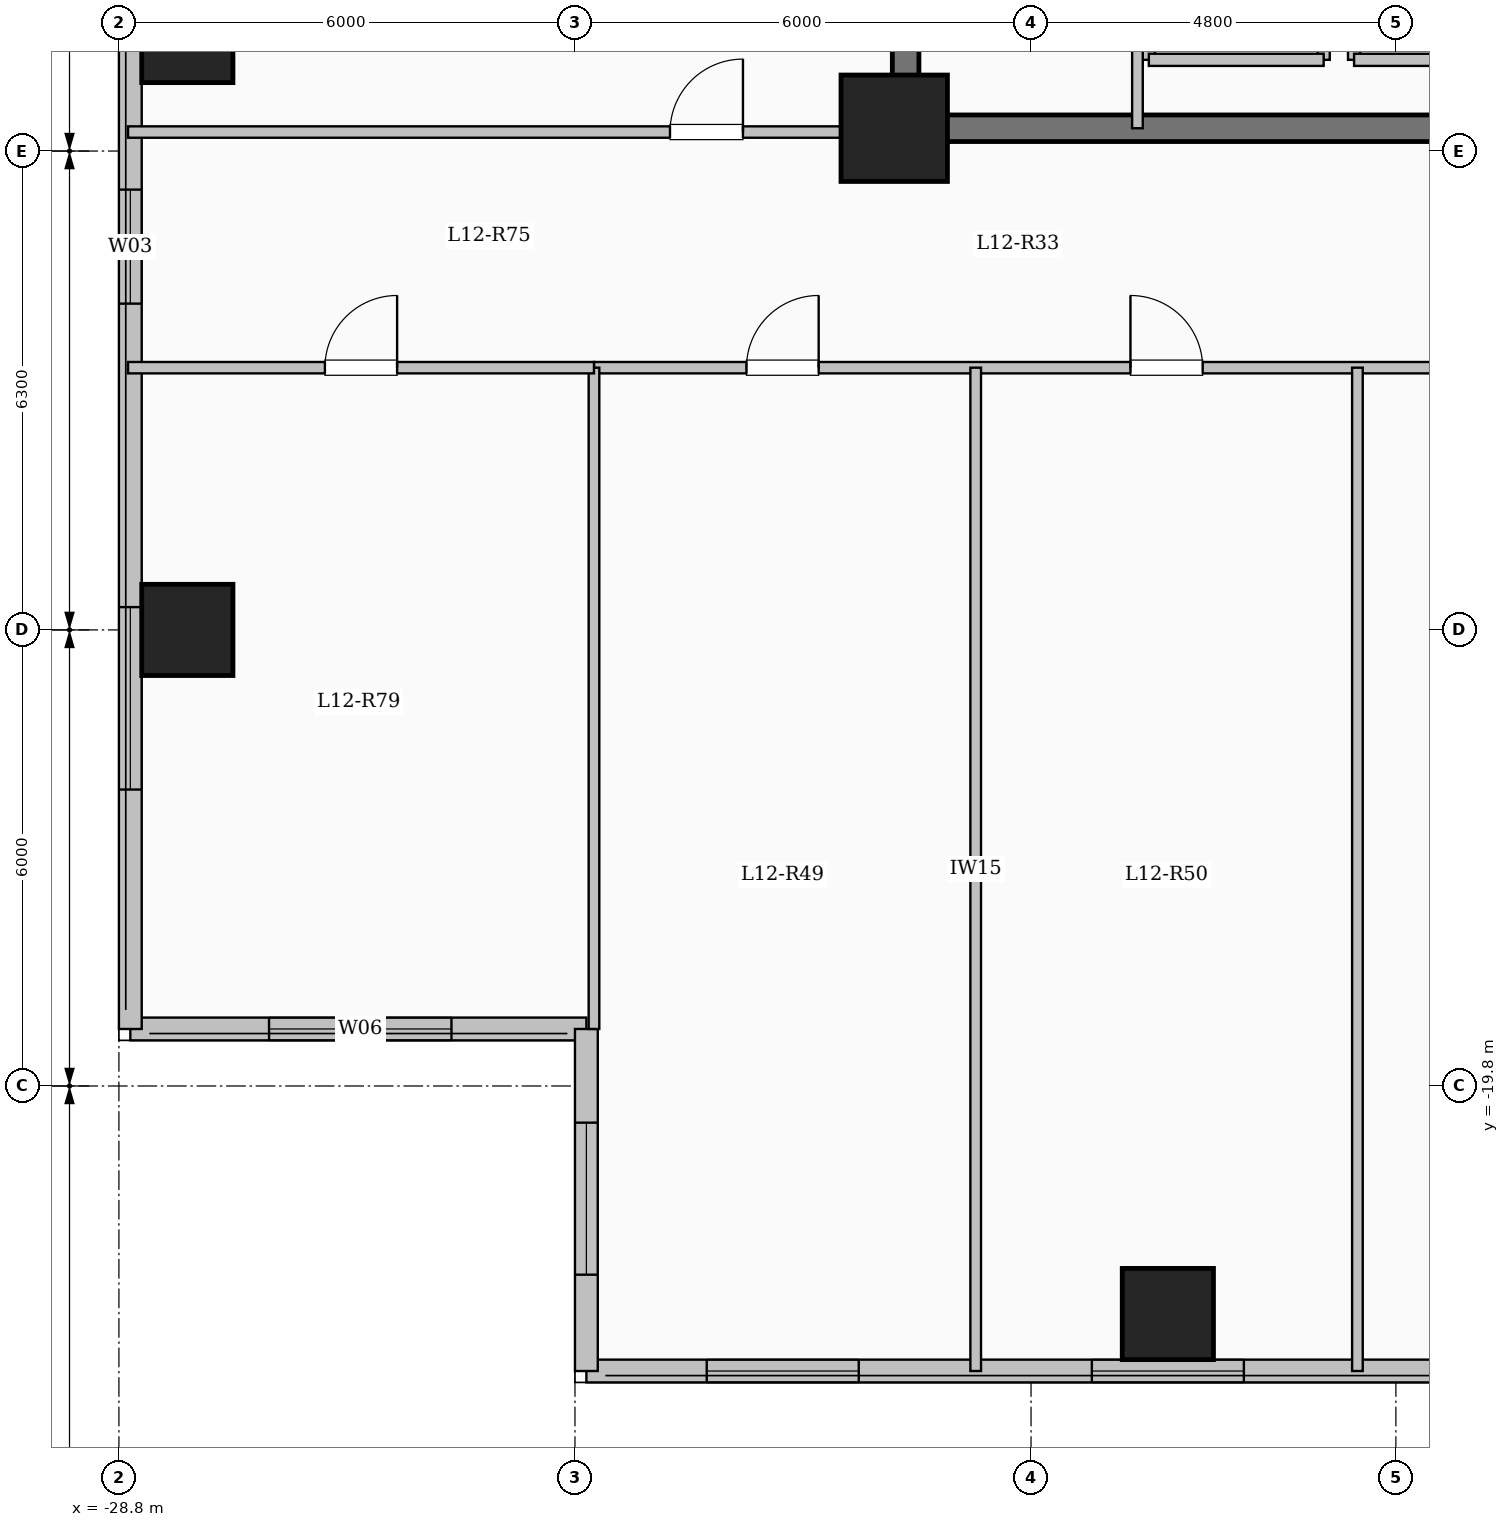
"""IFC4 building model, lengths in metres.
Left out: names, types, materials, properties, quantities, classifications, styles, units other than length and angle.
Written with IfcOpenShell. Run it as: python <this file> out.ifc"""

import sys

from ifc_helpers import new_model, si_unit, direction, frame, frame_2d, origin, origin_2d, place, context, subcontext, project, spatial, rectangle, extrude, element, fill, save


model = new_model("IFC4")
c1 = context("Model", 3, precision=1e-05, world=origin(), true_north=direction((0.0, 1.0)))
c2 = subcontext(c1, "Body", "Model", "MODEL_VIEW")
j1 = project(units=[si_unit("LENGTHUNIT", "METRE"), si_unit("PLANEANGLEUNIT", "RADIAN")], contexts=[c1])
p1 = place(None, origin())
s1 = spatial("IfcSite", under=j1, at=p1, CompositionType="ELEMENT")
p2 = place(p1, origin())
s2 = spatial("IfcBuilding", under=s1, at=p2, CompositionType="ELEMENT")
p3 = place(p2, frame((0.0, 0.0, 47.45)))
s3 = spatial("IfcBuildingStorey", under=s2, at=p3, CompositionType="ELEMENT", Elevation=47.45)
p4 = place(p3, frame((-18.6, -7.2, 0.0), z_axis=(0.0, 0.0, 1.0), x_axis=(1.0, 0.0, 0.0)))
e1 = element("IfcColumn", 1, at=p4, inside=s3, PredefinedType="COLUMN", context=c2, shape_type="SweptSolid", body=[
    extrude(rectangle(XDim=1.4, YDim=1.4, at=origin_2d()), origin(), (0.0, 0.0, 1.0), 3.35),
])
for number, where, z_axis, x_axis in (
    (2, (-15.0, -22.8, 0.0), (0.0, 0.0, 1.0), (1.0, 0.0, 0.0)),
    (3, (-27.9, -13.8, 0.0), (0.0, 0.0, 1.0), (1.0, 0.0, 0.0)),
    (4, (-27.9, -6.0, 0.0), (0.0, 0.0, 1.0), (1.0, 0.0, 0.0)),
):
    element("IfcColumn", number, at=place(p3, frame(where, z_axis=z_axis, x_axis=x_axis)), inside=s3, PredefinedType="COLUMN", context=c2, shape_type="SweptSolid", body=[
        extrude(rectangle(XDim=1.2, YDim=1.2, at=origin_2d()), origin(), (0.0, 0.0, 1.0), 3.35),
    ])
p5 = place(p3, frame((-22.65, -19.05, 0.0), z_axis=(0.0, 0.0, 1.0), x_axis=(-1.0, 0.0, 0.0)))
e5 = element("IfcWall", 5, at=p5, inside=s3, PredefinedType="SOLIDWALL", context=c2, shape_type="SweptSolid", body=[
    extrude(rectangle(XDim=6.0, YDim=0.3, at=frame_2d((3.0, 0.0))), origin(), (0.0, 0.0, 1.0), 3.1),
])
p6 = place(p5, frame((1.775, 0.0, 0.9)))
e6 = element("IfcOpeningElement", 6, at=p6, cuts=e5, PredefinedType="OPENING", context=c2, shape_type="SweptSolid", body=[
    extrude(rectangle(XDim=2.4, YDim=1.8, at=frame_2d((1.2, 0.9))), frame((0.0, 0.16, 0.0), z_axis=(0.0, -1.0, 0.0), x_axis=(1.0, 0.0, 0.0)), (0.0, 0.0, 1.0), 0.32),
])
p7 = place(p3, frame((-28.65, -19.05, 0.0), z_axis=(0.0, 0.0, 1.0), x_axis=(0.0, 1.0, 0.0)))
e7 = element("IfcWall", 7, at=p7, inside=s3, PredefinedType="SOLIDWALL", context=c2, shape_type="SweptSolid", body=[
    extrude(rectangle(XDim=38.1, YDim=0.3, at=frame_2d((19.05, 0.0))), origin(), (0.0, 0.0, 1.0), 3.1),
])
p8 = place(p7, frame((3.15, 0.0, 0.9)))
e8 = element("IfcOpeningElement", 8, at=p8, cuts=e7, PredefinedType="OPENING", context=c2, shape_type="SweptSolid", body=[
    extrude(rectangle(XDim=2.4, YDim=1.8, at=frame_2d((1.2, 0.9))), frame((0.0, 0.16, 0.0), z_axis=(0.0, -1.0, 0.0), x_axis=(1.0, 0.0, 0.0)), (0.0, 0.0, 1.0), 0.32),
])
p9 = place(p7, frame((9.542, 0.0, 0.9)))
e9 = element("IfcOpeningElement", 9, at=p9, cuts=e7, PredefinedType="OPENING", context=c2, shape_type="SweptSolid", body=[
    extrude(rectangle(XDim=1.5, YDim=1.65, at=frame_2d((0.75, 0.825))), frame((0.0, 0.16, 0.0), z_axis=(0.0, -1.0, 0.0), x_axis=(1.0, 0.0, 0.0)), (0.0, 0.0, 1.0), 0.32),
])
p10 = place(p7, frame((14.95, 0.0, 0.9)))
e10 = element("IfcOpeningElement", 10, at=p10, cuts=e7, PredefinedType="OPENING", context=c2, shape_type="SweptSolid", body=[
    extrude(rectangle(XDim=2.4, YDim=1.8, at=frame_2d((1.2, 0.9))), frame((0.0, 0.16, 0.0), z_axis=(0.0, -1.0, 0.0), x_axis=(1.0, 0.0, 0.0)), (0.0, 0.0, 1.0), 0.32),
])
p11 = place(p7, frame((21.375, 0.0, 0.9)))
e11 = element("IfcOpeningElement", 11, at=p11, cuts=e7, PredefinedType="OPENING", context=c2, shape_type="SweptSolid", body=[
    extrude(rectangle(XDim=1.8, YDim=1.65, at=frame_2d((0.9, 0.825))), frame((0.0, 0.16, 0.0), z_axis=(0.0, -1.0, 0.0), x_axis=(1.0, 0.0, 0.0)), (0.0, 0.0, 1.0), 0.32),
])
p12 = place(p7, frame((25.925, 0.0, 0.9)))
e12 = element("IfcOpeningElement", 12, at=p12, cuts=e7, PredefinedType="OPENING", context=c2, shape_type="SweptSolid", body=[
    extrude(rectangle(XDim=2.0, YDim=1.7, at=frame_2d((1.0, 0.85))), frame((0.0, 0.16, 0.0), z_axis=(0.0, -1.0, 0.0), x_axis=(1.0, 0.0, 0.0)), (0.0, 0.0, 1.0), 0.32),
])
p13 = place(p7, frame((30.175, 0.0, 0.95)))
e13 = element("IfcOpeningElement", 13, at=p13, cuts=e7, PredefinedType="OPENING", context=c2, shape_type="SweptSolid", body=[
    extrude(rectangle(XDim=1.0, YDim=1.5, at=frame_2d((0.5, 0.75))), frame((0.0, 0.16, 0.0), z_axis=(0.0, -1.0, 0.0), x_axis=(1.0, 0.0, 0.0)), (0.0, 0.0, 1.0), 0.32),
])
p14 = place(p7, frame((33.85, 0.0, 0.9)))
e14 = element("IfcOpeningElement", 14, at=p14, cuts=e7, PredefinedType="OPENING", context=c2, shape_type="SweptSolid", body=[
    extrude(rectangle(XDim=2.0, YDim=1.7, at=frame_2d((1.0, 0.85))), frame((0.0, 0.16, 0.0), z_axis=(0.0, -1.0, 0.0), x_axis=(1.0, 0.0, 0.0)), (0.0, 0.0, 1.0), 0.32),
])
p15 = place(p3, frame((-7.35, -23.55, 0.0), z_axis=(0.0, 0.0, 1.0), x_axis=(-1.0, 0.0, 0.0)))
e15 = element("IfcWall", 15, at=p15, inside=s3, PredefinedType="SOLIDWALL", context=c2, shape_type="SweptSolid", body=[
    extrude(rectangle(XDim=15.3, YDim=0.3, at=frame_2d((7.65, 0.0))), origin(), (0.0, 0.0, 1.0), 3.1),
])
p16 = place(p15, frame((0.147, 0.0, 0.95)))
e16 = element("IfcOpeningElement", 16, at=p16, cuts=e15, PredefinedType="OPENING", context=c2, shape_type="SweptSolid", body=[
    extrude(rectangle(XDim=0.85, YDim=1.5, at=frame_2d((0.425, 0.75))), frame((0.0, 0.16, 0.0), z_axis=(0.0, -1.0, 0.0), x_axis=(1.0, 0.0, 0.0)), (0.0, 0.0, 1.0), 0.32),
])
p17 = place(p15, frame((2.16, 0.0, 0.9)))
e17 = element("IfcOpeningElement", 17, at=p17, cuts=e15, PredefinedType="OPENING", context=c2, shape_type="SweptSolid", body=[
    extrude(rectangle(XDim=2.0, YDim=1.7, at=frame_2d((1.0, 0.85))), frame((0.0, 0.16, 0.0), z_axis=(0.0, -1.0, 0.0), x_axis=(1.0, 0.0, 0.0)), (0.0, 0.0, 1.0), 0.32),
])
p18 = place(p15, frame((6.65, 0.0, 0.9)))
e18 = element("IfcOpeningElement", 18, at=p18, cuts=e15, PredefinedType="OPENING", context=c2, shape_type="SweptSolid", body=[
    extrude(rectangle(XDim=2.0, YDim=1.7, at=frame_2d((1.0, 0.85))), frame((0.0, 0.16, 0.0), z_axis=(0.0, -1.0, 0.0), x_axis=(1.0, 0.0, 0.0)), (0.0, 0.0, 1.0), 0.32),
])
p19 = place(p15, frame((11.717, 0.0, 0.9)))
e19 = element("IfcOpeningElement", 19, at=p19, cuts=e15, PredefinedType="OPENING", context=c2, shape_type="SweptSolid", body=[
    extrude(rectangle(XDim=2.0, YDim=1.7, at=frame_2d((1.0, 0.85))), frame((0.0, 0.16, 0.0), z_axis=(0.0, -1.0, 0.0), x_axis=(1.0, 0.0, 0.0)), (0.0, 0.0, 1.0), 0.32),
])
p20 = place(p3, frame((-22.65, -23.55, 0.0), z_axis=(0.0, 0.0, 1.0), x_axis=(0.0, 1.0, 0.0)))
e20 = element("IfcWall", 20, at=p20, inside=s3, PredefinedType="SOLIDWALL", context=c2, shape_type="SweptSolid", body=[
    extrude(rectangle(XDim=4.5, YDim=0.3, at=frame_2d((2.25, 0.0))), origin(), (0.0, 0.0, 1.0), 3.1),
])
p21 = place(p20, frame((1.268, 0.0, 0.9)))
e21 = element("IfcOpeningElement", 21, at=p21, cuts=e20, PredefinedType="OPENING", context=c2, shape_type="SweptSolid", body=[
    extrude(rectangle(XDim=2.0, YDim=1.7, at=frame_2d((1.0, 0.85))), frame((0.0, 0.16, 0.0), z_axis=(0.0, -1.0, 0.0), x_axis=(1.0, 0.0, 0.0)), (0.0, 0.0, 1.0), 0.32),
])
p22 = place(p3, frame((-12.55, -6.3, 0.0), z_axis=(0.0, 0.0, 1.0), x_axis=(0.0, 1.0, 0.0)))
e22 = element("IfcWall", 22, at=p22, inside=s3, PredefinedType="SOLIDWALL", context=c2, shape_type="SweptSolid", body=[
    extrude(rectangle(XDim=2.6, YDim=0.16, at=frame_2d((1.3, 0.0))), origin(), (0.0, 0.0, 1.0), 3.1),
])
p23 = place(p3, frame((-12.55, -6.3, 0.0), z_axis=(0.0, 0.0, 1.0), x_axis=(1.0, 0.0, 0.0)))
e23 = element("IfcWall", 23, at=p23, inside=s3, PredefinedType="SOLIDWALL", context=c2, shape_type="SweptSolid", body=[
    extrude(rectangle(XDim=2.3, YDim=0.16, at=frame_2d((1.15, 0.0))), origin(), (0.0, 0.0, 1.0), 3.1),
])
for number, where, z_axis, x_axis in (
    (24, (-15.25, -6.3, 0.0), (0.0, 0.0, 1.0), (0.0, 1.0, 0.0)),
    (25, (-12.95, -6.3, 0.0), (0.0, 0.0, 1.0), (0.0, 1.0, 0.0)),
):
    element("IfcWall", number, at=place(p3, frame(where, z_axis=z_axis, x_axis=x_axis)), inside=s3, PredefinedType="SOLIDWALL", context=c2, shape_type="SweptSolid", body=[
        extrude(rectangle(XDim=2.6, YDim=0.16, at=frame_2d((1.3, 0.0))), origin(), (0.0, 0.0, 1.0), 3.1),
    ])
p24 = place(p3, frame((-15.25, -6.3, 0.0), z_axis=(0.0, 0.0, 1.0), x_axis=(1.0, 0.0, 0.0)))
e26 = element("IfcWall", 26, at=p24, inside=s3, PredefinedType="SOLIDWALL", context=c2, shape_type="SweptSolid", body=[
    extrude(rectangle(XDim=2.3, YDim=0.16, at=frame_2d((1.15, 0.0))), origin(), (0.0, 0.0, 1.0), 3.1),
])
p25 = place(p3, frame((-18.45, -7.375, 0.0), z_axis=(0.0, 0.0, 1.0), x_axis=(0.0, 1.0, 0.0)))
e27 = element("IfcWall", 27, at=p25, inside=s3, PredefinedType="SHEAR", context=c2, shape_type="SweptSolid", body=[
    extrude(rectangle(XDim=14.05, YDim=0.35, at=frame_2d((7.025, 0.0))), origin(), (0.0, 0.0, 1.0), 3.35),
])
p26 = place(p3, frame((-18.625, -7.2, 0.0), z_axis=(0.0, 0.0, 1.0), x_axis=(1.0, 0.0, 0.0)))
e28 = element("IfcWall", 28, at=p26, inside=s3, PredefinedType="SHEAR", context=c2, shape_type="SweptSolid", body=[
    extrude(rectangle(XDim=8.55, YDim=0.35, at=frame_2d((4.275, 0.0))), origin(), (0.0, 0.0, 1.0), 3.35),
])
p27 = place(p3, frame((-15.4, -7.2, 0.0), z_axis=(0.0, 0.0, 1.0), x_axis=(0.0, 1.0, 0.0)))
e29 = element("IfcWall", 29, at=p27, inside=s3, PredefinedType="PARTITIONING", context=c2, shape_type="SweptSolid", body=[
    extrude(rectangle(XDim=10.45, YDim=0.14, at=frame_2d((5.225, 0.0))), origin(), (0.0, 0.0, 1.0), 3.1),
])
p28 = place(p27, frame((9.25, 0.0, 0.0)))
e30 = element("IfcOpeningElement", 30, at=p28, cuts=e29, PredefinedType="OPENING", context=c2, shape_type="SweptSolid", body=[
    extrude(rectangle(XDim=0.9, YDim=2.08, at=frame_2d((0.45, 1.04))), frame((0.0, 0.08, 0.0), z_axis=(0.0, -1.0, 0.0), x_axis=(1.0, 0.0, 0.0)), (0.0, 0.0, 1.0), 0.16),
])
p29 = place(p3, frame((-22.55, -10.35, 0.0), z_axis=(0.0, 0.0, 1.0), x_axis=(1.0, 0.0, 0.0)))
e31 = element("IfcWall", 31, at=p29, inside=s3, PredefinedType="PARTITIONING", context=c2, shape_type="SweptSolid", body=[
    extrude(rectangle(XDim=14.0, YDim=0.15, at=frame_2d((7.0, 0.0))), origin(), (0.0, 0.0, 1.0), 3.1),
])
p30 = place(p29, frame((2.006, 0.0, 0.0)))
e32 = element("IfcOpeningElement", 32, at=p30, cuts=e31, PredefinedType="OPENING", context=c2, shape_type="SweptSolid", body=[
    extrude(rectangle(XDim=0.95, YDim=2.15, at=frame_2d((0.475, 1.075))), frame((0.0, 0.085, 0.0), z_axis=(0.0, -1.0, 0.0), x_axis=(1.0, 0.0, 0.0)), (0.0, 0.0, 1.0), 0.17),
])
p31 = place(p29, frame((7.058, 0.0, 0.0)))
e33 = element("IfcOpeningElement", 33, at=p31, cuts=e31, PredefinedType="OPENING", context=c2, shape_type="SweptSolid", body=[
    extrude(rectangle(XDim=0.95, YDim=2.15, at=frame_2d((0.475, 1.075))), frame((0.0, 0.085, 0.0), z_axis=(0.0, -1.0, 0.0), x_axis=(1.0, 0.0, 0.0)), (0.0, 0.0, 1.0), 0.17),
])
p32 = place(p29, frame((11.552, 0.0, 0.0)))
e34 = element("IfcOpeningElement", 34, at=p32, cuts=e31, PredefinedType="OPENING", context=c2, shape_type="SweptSolid", body=[
    extrude(rectangle(XDim=0.95, YDim=2.15, at=frame_2d((0.475, 1.075))), frame((0.0, 0.085, 0.0), z_axis=(0.0, -1.0, 0.0), x_axis=(1.0, 0.0, 0.0)), (0.0, 0.0, 1.0), 0.17),
])
for number, where, z_axis, x_axis in (
    (35, (-17.528, -23.55, 0.0), (0.0, 0.0, 1.0), (0.0, 1.0, 0.0)),
    (36, (-12.506, -23.55, 0.0), (0.0, 0.0, 1.0), (0.0, 1.0, 0.0)),
):
    element("IfcWall", number, at=place(p3, frame(where, z_axis=z_axis, x_axis=x_axis)), inside=s3, PredefinedType="PARTITIONING", context=c2, shape_type="SweptSolid", body=[
        extrude(rectangle(XDim=13.2, YDim=0.14, at=frame_2d((6.6, 0.0))), origin(), (0.0, 0.0, 1.0), 3.1),
    ])
p33 = place(p3, frame((-28.68, -7.25, 0.0), z_axis=(0.0, 0.0, 1.0), x_axis=(1.0, 0.0, 0.0)))
e37 = element("IfcWall", 37, at=p33, inside=s3, PredefinedType="PARTITIONING", context=c2, shape_type="SweptSolid", body=[
    extrude(rectangle(XDim=10.23, YDim=0.15, at=frame_2d((5.115, 0.0))), origin(), (0.0, 0.0, 1.0), 3.1),
])
p34 = place(p33, frame((7.13, 0.0, 0.0)))
e38 = element("IfcOpeningElement", 38, at=p34, cuts=e37, PredefinedType="OPENING", context=c2, shape_type="SweptSolid", body=[
    extrude(rectangle(XDim=0.96, YDim=2.15, at=frame_2d((0.48, 1.075))), frame((0.0, 0.085, 0.0), z_axis=(0.0, -1.0, 0.0), x_axis=(1.0, 0.0, 0.0)), (0.0, 0.0, 1.0), 0.17),
])
p35 = place(p3, frame((-22.55, -19.05, 0.0), z_axis=(0.0, 0.0, 1.0), x_axis=(0.0, 1.0, 0.0)))
e39 = element("IfcWall", 39, at=p35, inside=s3, PredefinedType="PARTITIONING", context=c2, shape_type="SweptSolid", body=[
    extrude(rectangle(XDim=8.7, YDim=0.14, at=frame_2d((4.35, 0.0))), origin(), (0.0, 0.0, 1.0), 3.1),
])
p36 = place(p3, frame((-28.68, -10.35, 0.0), z_axis=(0.0, 0.0, 1.0), x_axis=(1.0, 0.0, 0.0)))
e40 = element("IfcWall", 40, at=p36, inside=s3, PredefinedType="PARTITIONING", context=c2, shape_type="SweptSolid", body=[
    extrude(rectangle(XDim=6.13, YDim=0.15, at=frame_2d((3.065, 0.0))), origin(), (0.0, 0.0, 1.0), 3.1),
])
p37 = place(p36, frame((2.59, 0.0, 0.0)))
e41 = element("IfcOpeningElement", 41, at=p37, cuts=e40, PredefinedType="OPENING", context=c2, shape_type="SweptSolid", body=[
    extrude(rectangle(XDim=0.95, YDim=2.15, at=frame_2d((0.475, 1.075))), frame((0.0, 0.085, 0.0), z_axis=(0.0, -1.0, 0.0), x_axis=(1.0, 0.0, 0.0)), (0.0, 0.0, 1.0), 0.17),
])
p38 = place(p6, origin())
e42 = element("IfcWindow", 42, at=p38, inside=s3, PartitioningType="SINGLE_PANEL", PredefinedType="WINDOW", context=c2, shape_type="SweptSolid", body=[
    extrude(rectangle(XDim=2.4, YDim=1.8, at=frame_2d((1.2, 0.9))), frame((0.0, 0.03, 0.0), z_axis=(0.0, -1.0, 0.0), x_axis=(1.0, 0.0, 0.0)), (0.0, 0.0, 1.0), 0.06),
])
fill(e6, e42)
p39 = place(p8, origin())
e43 = element("IfcWindow", 43, at=p39, inside=s3, PartitioningType="SINGLE_PANEL", PredefinedType="WINDOW", context=c2, shape_type="SweptSolid", body=[
    extrude(rectangle(XDim=2.4, YDim=1.8, at=frame_2d((1.2, 0.9))), frame((0.0, 0.03, 0.0), z_axis=(0.0, -1.0, 0.0), x_axis=(1.0, 0.0, 0.0)), (0.0, 0.0, 1.0), 0.06),
])
fill(e8, e43)
p40 = place(p9, origin())
e44 = element("IfcWindow", 44, at=p40, inside=s3, PartitioningType="SINGLE_PANEL", PredefinedType="WINDOW", context=c2, shape_type="SweptSolid", body=[
    extrude(rectangle(XDim=1.5, YDim=1.65, at=frame_2d((0.75, 0.825))), frame((0.0, 0.03, 0.0), z_axis=(0.0, -1.0, 0.0), x_axis=(1.0, 0.0, 0.0)), (0.0, 0.0, 1.0), 0.06),
])
fill(e9, e44)
p41 = place(p18, origin())
e45 = element("IfcWindow", 45, at=p41, inside=s3, PartitioningType="SINGLE_PANEL", PredefinedType="WINDOW", context=c2, shape_type="SweptSolid", body=[
    extrude(rectangle(XDim=2.0, YDim=1.7, at=frame_2d((1.0, 0.85))), frame((0.0, 0.03, 0.0), z_axis=(0.0, -1.0, 0.0), x_axis=(1.0, 0.0, 0.0)), (0.0, 0.0, 1.0), 0.06),
])
fill(e18, e45)
p42 = place(p19, origin())
e46 = element("IfcWindow", 46, at=p42, inside=s3, PartitioningType="SINGLE_PANEL", PredefinedType="WINDOW", context=c2, shape_type="SweptSolid", body=[
    extrude(rectangle(XDim=2.0, YDim=1.7, at=frame_2d((1.0, 0.85))), frame((0.0, 0.03, 0.0), z_axis=(0.0, -1.0, 0.0), x_axis=(1.0, 0.0, 0.0)), (0.0, 0.0, 1.0), 0.06),
])
fill(e19, e46)
p43 = place(p21, origin())
e47 = element("IfcWindow", 47, at=p43, inside=s3, PartitioningType="SINGLE_PANEL", PredefinedType="WINDOW", context=c2, shape_type="SweptSolid", body=[
    extrude(rectangle(XDim=2.0, YDim=1.7, at=frame_2d((1.0, 0.85))), frame((0.0, 0.03, 0.0), z_axis=(0.0, -1.0, 0.0), x_axis=(1.0, 0.0, 0.0)), (0.0, 0.0, 1.0), 0.06),
])
fill(e21, e47)
p44 = place(p30, origin())
e48 = element("IfcDoor", 48, at=p44, inside=s3, OperationType="SINGLE_SWING_RIGHT", PredefinedType="DOOR", context=c2, shape_type="SweptSolid", body=[
    extrude(rectangle(XDim=0.95, YDim=2.15, at=frame_2d((0.475, 1.075))), frame((0.0, 0.025, 0.0), z_axis=(0.0, -1.0, 0.0), x_axis=(1.0, 0.0, 0.0)), (0.0, 0.0, 1.0), 0.05),
])
fill(e32, e48)
p45 = place(p31, origin())
e49 = element("IfcDoor", 49, at=p45, inside=s3, OperationType="SINGLE_SWING_LEFT", PredefinedType="DOOR", context=c2, shape_type="SweptSolid", body=[
    extrude(rectangle(XDim=0.95, YDim=2.15, at=frame_2d((0.475, 1.075))), frame((0.0, 0.025, 0.0), z_axis=(0.0, -1.0, 0.0), x_axis=(1.0, 0.0, 0.0)), (0.0, 0.0, 1.0), 0.05),
])
fill(e33, e49)
p46 = place(p37, origin())
e50 = element("IfcDoor", 50, at=p46, inside=s3, OperationType="SINGLE_SWING_RIGHT", PredefinedType="DOOR", context=c2, shape_type="SweptSolid", body=[
    extrude(rectangle(XDim=0.95, YDim=2.15, at=frame_2d((0.475, 1.075))), frame((0.0, 0.025, 0.0), z_axis=(0.0, -1.0, 0.0), x_axis=(1.0, 0.0, 0.0)), (0.0, 0.0, 1.0), 0.05),
])
fill(e41, e50)
p47 = place(p34, origin())
e51 = element("IfcDoor", 51, at=p47, inside=s3, OperationType="SINGLE_SWING_RIGHT", PredefinedType="DOOR", context=c2, shape_type="SweptSolid", body=[
    extrude(rectangle(XDim=0.96, YDim=2.15, at=frame_2d((0.48, 1.075))), frame((0.0, 0.025, 0.0), z_axis=(0.0, -1.0, 0.0), x_axis=(1.0, 0.0, 0.0)), (0.0, 0.0, 1.0), 0.05),
])
fill(e38, e51)
save(model, sys.argv[1])
